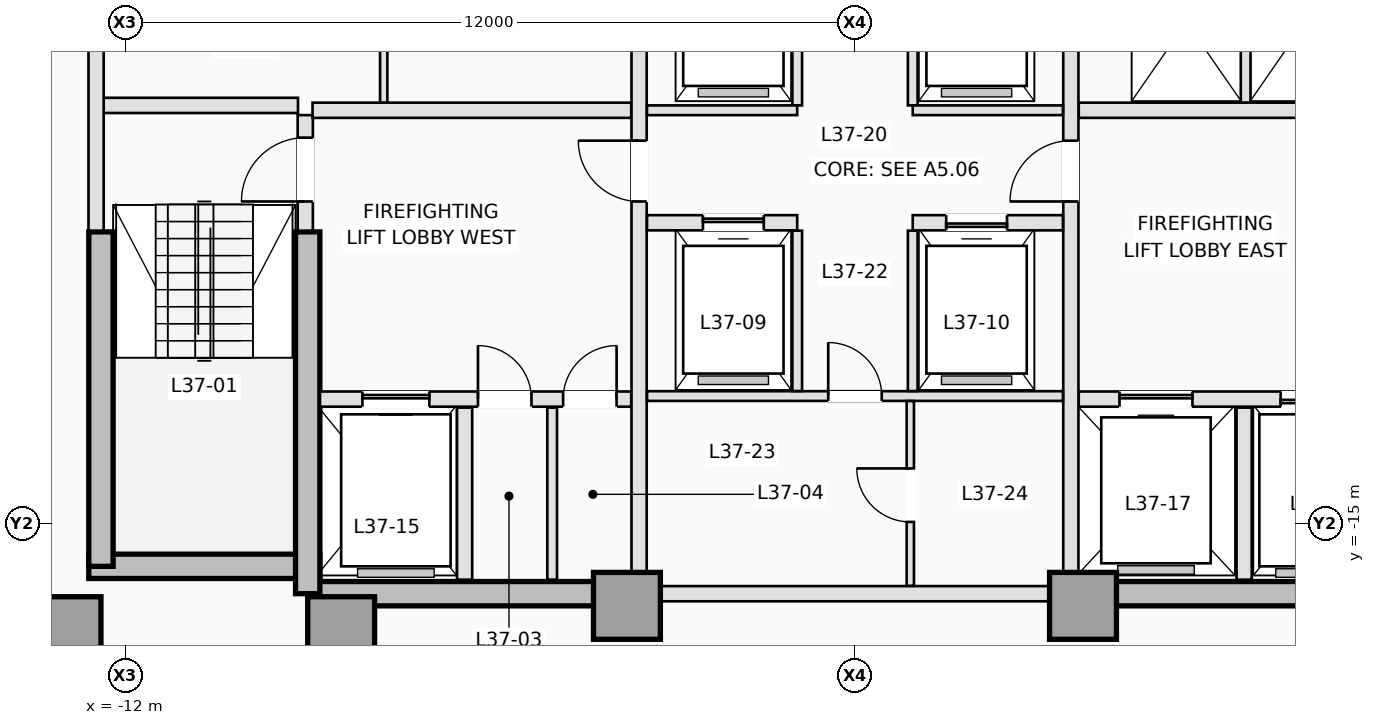
"""IFC4 building model, lengths in metres.
Left out: names, types, materials, properties, quantities, classifications, styles, units other than length and angle.
Written with IfcOpenShell. Run it as: python <this file> out.ifc"""

import sys

from ifc_helpers import new_model, si_unit, direction, frame, frame_2d, origin, origin_2d, place, context, subcontext, project, spatial, rectangle, extrude, element, fill, save


model = new_model("IFC4")
c1 = context("Model", 3, precision=1e-05, world=origin(), true_north=direction((0.0, 1.0)))
c2 = subcontext(c1, "Body", "Model", "MODEL_VIEW")
j1 = project(units=[si_unit("LENGTHUNIT", "METRE"), si_unit("PLANEANGLEUNIT", "RADIAN")], contexts=[c1])
p1 = place(None, origin())
s1 = spatial("IfcSite", under=j1, at=p1, CompositionType="ELEMENT")
p2 = place(p1, origin())
s2 = spatial("IfcBuilding", under=s1, at=p2, CompositionType="ELEMENT")
p3 = place(p2, frame((0.0, 0.0, 137.0)))
s3 = spatial("IfcBuildingStorey", under=s2, at=p3, CompositionType="ELEMENT", Elevation=137.0)
p4 = place(p3, frame((-12.6, -15.7, 0.0), z_axis=(0.0, 0.0, 1.0), x_axis=(1.0, 0.0, 0.0)))
e1 = element("IfcWall", 1, at=p4, inside=s3, PredefinedType="SHEAR", context=c2, shape_type="SweptSolid", body=[
    extrude(rectangle(XDim=3.8, YDim=0.4, at=frame_2d((1.9, 0.0))), origin(), (0.0, 0.0, 1.0), 3.5),
])
for number, where, z_axis, x_axis in (
    (2, (-9.0, -16.15, 0.0), (0.0, 0.0, 1.0), (1.0, 0.0, 0.0)),
    (3, (3.75, -16.15, 0.0), (0.0, 0.0, 1.0), (1.0, 0.0, 0.0)),
):
    element("IfcWall", number, at=place(p3, frame(where, z_axis=z_axis, x_axis=x_axis)), inside=s3, PredefinedType="SHEAR", context=c2, shape_type="SweptSolid", body=[
        extrude(rectangle(XDim=5.25, YDim=0.4, at=frame_2d((2.625, 0.0))), origin(), (0.0, 0.0, 1.0), 3.5),
    ])
p5 = place(p3, frame((-12.4, -15.7, 0.0), z_axis=(0.0, 0.0, 1.0), x_axis=(0.0, 1.0, 0.0)))
e4 = element("IfcWall", 4, at=p5, inside=s3, PredefinedType="SHEAR", context=c2, shape_type="SweptSolid", body=[
    extrude(rectangle(XDim=5.5, YDim=0.4, at=frame_2d((2.75, 0.0))), origin(), (0.0, 0.0, 1.0), 3.5),
])
p6 = place(p3, frame((-9.0, -16.15, 0.0), z_axis=(0.0, 0.0, 1.0), x_axis=(0.0, 1.0, 0.0)))
e5 = element("IfcWall", 5, at=p6, inside=s3, PredefinedType="SHEAR", context=c2, shape_type="SweptSolid", body=[
    extrude(rectangle(XDim=5.95, YDim=0.4, at=frame_2d((2.975, 0.0))), origin(), (0.0, 0.0, 1.0), 3.5),
])
for number, where, z_axis, x_axis in (
    (6, (-12.95, -16.75, 0.0), (0.0, 0.0, 1.0), (1.0, 0.0, 0.0)),
    (7, (-8.45, -16.75, 0.0), (0.0, 0.0, 1.0), (1.0, 0.0, 0.0)),
    (8, (-3.75, -16.35, 0.0), (0.0, 0.0, 1.0), (1.0, 0.0, 0.0)),
    (9, (3.75, -16.35, 0.0), (0.0, 0.0, 1.0), (1.0, 0.0, 0.0)),
):
    element("IfcColumn", number, at=place(p3, frame(where, z_axis=z_axis, x_axis=x_axis)), inside=s3, PredefinedType="COLUMN", context=c2, shape_type="SweptSolid", body=[
        extrude(rectangle(XDim=1.1, YDim=1.1, at=origin_2d()), origin(), (0.0, 0.0, 1.0), 3.5),
    ])
p7 = place(p3, frame((-9.04, -10.18, 0.0), z_axis=(0.0, 0.0, 1.0), x_axis=(0.0, 1.0, 0.0)))
e10 = element("IfcWall", 10, at=p7, inside=s3, PredefinedType="PARTITIONING", context=c2, shape_type="SweptSolid", body=[
    extrude(rectangle(XDim=1.9, YDim=0.25, at=frame_2d((0.95, 0.0))), origin(), (0.0, 0.0, 1.0), 3.25),
])
p8 = place(p7, frame((0.48, 0.0, 0.0)))
e11 = element("IfcOpeningElement", 11, at=p8, cuts=e10, PredefinedType="OPENING", context=c2, shape_type="SweptSolid", body=[
    extrude(rectangle(XDim=1.05, YDim=2.15, at=frame_2d((0.525, 1.075))), frame((0.0, 0.135, 0.0), z_axis=(0.0, -1.0, 0.0), x_axis=(1.0, 0.0, 0.0)), (0.0, 0.0, 1.0), 0.27),
])
p9 = place(p3, frame((-12.38, -8.12, 0.0), z_axis=(0.0, 0.0, 1.0), x_axis=(1.0, 0.0, 0.0)))
e12 = element("IfcWall", 12, at=p9, inside=s3, PredefinedType="PARTITIONING", context=c2, shape_type="SweptSolid", body=[
    extrude(rectangle(XDim=3.22, YDim=0.25, at=frame_2d((1.61, 0.0))), origin(), (0.0, 0.0, 1.0), 3.25),
])
p10 = place(p3, frame((-12.48, -10.18, 0.0), z_axis=(0.0, 0.0, 1.0), x_axis=(0.0, 1.0, 0.0)))
e13 = element("IfcWall", 13, at=p10, inside=s3, PredefinedType="PARTITIONING", context=c2, shape_type="SweptSolid", body=[
    extrude(rectangle(XDim=4.828, YDim=0.25, at=frame_2d((2.414, 0.0))), origin(), (0.0, 0.0, 1.0), 3.25),
])
p11 = place(p3, frame((-8.798, -12.95, 0.0), z_axis=(0.0, 0.0, 1.0), x_axis=(1.0, 0.0, 0.0)))
e14 = element("IfcWall", 14, at=p11, inside=s3, PredefinedType="PARTITIONING", context=c2, shape_type="SweptSolid", body=[
    extrude(rectangle(XDim=5.118, YDim=0.25, at=frame_2d((2.559, 0.0))), origin(), (0.0, 0.0, 1.0), 3.25),
])
p12 = place(p11, frame((0.698, 0.0, 0.0)))
e15 = element("IfcOpeningElement", 15, at=p12, cuts=e14, PredefinedType="OPENING", context=c2, shape_type="SweptSolid", body=[
    extrude(rectangle(XDim=1.1, YDim=2.15, at=frame_2d((0.55, 1.075))), frame((0.0, 0.135, 0.0), z_axis=(0.0, -1.0, 0.0), x_axis=(1.0, 0.0, 0.0)), (0.0, 0.0, 1.0), 0.27),
])
p13 = place(p11, frame((2.598, 0.0, 0.0)))
e16 = element("IfcOpeningElement", 16, at=p13, cuts=e14, PredefinedType="OPENING", context=c2, shape_type="SweptSolid", body=[
    extrude(rectangle(XDim=0.88, YDim=2.1, at=frame_2d((0.44, 1.05))), frame((0.0, 0.135, 0.0), z_axis=(0.0, -1.0, 0.0), x_axis=(1.0, 0.0, 0.0)), (0.0, 0.0, 1.0), 0.27),
])
p14 = place(p11, frame((3.998, 0.0, 0.0)))
e17 = element("IfcOpeningElement", 17, at=p14, cuts=e14, PredefinedType="OPENING", context=c2, shape_type="SweptSolid", body=[
    extrude(rectangle(XDim=0.88, YDim=2.1, at=frame_2d((0.44, 1.05))), frame((0.0, 0.135, 0.0), z_axis=(0.0, -1.0, 0.0), x_axis=(1.0, 0.0, 0.0)), (0.0, 0.0, 1.0), 0.27),
])
p15 = place(p3, frame((3.68, -12.95, 0.0), z_axis=(0.0, 0.0, 1.0), x_axis=(1.0, 0.0, 0.0)))
e18 = element("IfcWall", 18, at=p15, inside=s3, PredefinedType="PARTITIONING", context=c2, shape_type="SweptSolid", body=[
    extrude(rectangle(XDim=5.118, YDim=0.25, at=frame_2d((2.559, 0.0))), origin(), (0.0, 0.0, 1.0), 3.25),
])
p16 = place(p15, frame((3.32, 0.0, 0.0)))
e19 = element("IfcOpeningElement", 19, at=p16, cuts=e18, PredefinedType="OPENING", context=c2, shape_type="SweptSolid", body=[
    extrude(rectangle(XDim=1.1, YDim=2.15, at=frame_2d((0.55, 1.075))), frame((0.0, 0.135, 0.0), z_axis=(0.0, -1.0, 0.0), x_axis=(1.0, 0.0, 0.0)), (0.0, 0.0, 1.0), 0.27),
])
p17 = place(p15, frame((0.67, 0.0, 0.0)))
e20 = element("IfcOpeningElement", 20, at=p17, cuts=e18, PredefinedType="OPENING", context=c2, shape_type="SweptSolid", body=[
    extrude(rectangle(XDim=1.2, YDim=2.15, at=frame_2d((0.6, 1.075))), frame((0.0, 0.135, 0.0), z_axis=(0.0, -1.0, 0.0), x_axis=(1.0, 0.0, 0.0)), (0.0, 0.0, 1.0), 0.27),
])
p18 = place(p3, frame((-6.42, -15.92, 0.0), z_axis=(0.0, 0.0, 1.0), x_axis=(0.0, 1.0, 0.0)))
e21 = element("IfcWall", 21, at=p18, inside=s3, PredefinedType="PARTITIONING", context=c2, shape_type="SweptSolid", body=[
    extrude(rectangle(XDim=2.83, YDim=0.25, at=frame_2d((1.415, 0.0))), origin(), (0.0, 0.0, 1.0), 3.25),
])
p19 = place(p3, frame((-4.98, -15.92, 0.0), z_axis=(0.0, 0.0, 1.0), x_axis=(0.0, 1.0, 0.0)))
e22 = element("IfcWall", 22, at=p19, inside=s3, PredefinedType="PARTITIONING", context=c2, shape_type="SweptSolid", body=[
    extrude(rectangle(XDim=2.83, YDim=0.16, at=frame_2d((1.415, 0.0))), origin(), (0.0, 0.0, 1.0), 3.25),
])
p20 = place(p3, frame((6.4, -15.92, 0.0), z_axis=(0.0, 0.0, 1.0), x_axis=(0.0, 1.0, 0.0)))
e23 = element("IfcWall", 23, at=p20, inside=s3, PredefinedType="PARTITIONING", context=c2, shape_type="SweptSolid", body=[
    extrude(rectangle(XDim=2.83, YDim=0.25, at=frame_2d((1.415, 0.0))), origin(), (0.0, 0.0, 1.0), 3.25),
])
for number, where, z_axis, x_axis in (
    (24, (-8.92, -8.2, 0.0), (0.0, 0.0, 1.0), (1.0, 0.0, 0.0)),
    (25, (3.68, -8.2, 0.0), (0.0, 0.0, 1.0), (1.0, 0.0, 0.0)),
):
    element("IfcWall", number, at=place(p3, frame(where, z_axis=z_axis, x_axis=x_axis)), inside=s3, PredefinedType="PARTITIONING", context=c2, shape_type="SweptSolid", body=[
        extrude(rectangle(XDim=5.24, YDim=0.25, at=frame_2d((2.62, 0.0))), origin(), (0.0, 0.0, 1.0), 3.25),
    ])
p21 = place(p3, frame((-3.55, -15.798, 0.0), z_axis=(0.0, 0.0, 1.0), x_axis=(0.0, 1.0, 0.0)))
e26 = element("IfcWall", 26, at=p21, inside=s3, PredefinedType="PARTITIONING", context=c2, shape_type="SweptSolid", body=[
    extrude(rectangle(XDim=10.446, YDim=0.25, at=frame_2d((5.223, 0.0))), origin(), (0.0, 0.0, 1.0), 3.25),
])
p22 = place(p21, frame((6.098, 0.0, 0.0)))
e27 = element("IfcOpeningElement", 27, at=p22, cuts=e26, PredefinedType="OPENING", context=c2, shape_type="SweptSolid", body=[
    extrude(rectangle(XDim=1.0, YDim=2.15, at=frame_2d((0.5, 1.075))), frame((0.0, 0.135, 0.0), z_axis=(0.0, -1.0, 0.0), x_axis=(1.0, 0.0, 0.0)), (0.0, 0.0, 1.0), 0.27),
])
p23 = place(p3, frame((3.55, -15.798, 0.0), z_axis=(0.0, 0.0, 1.0), x_axis=(0.0, 1.0, 0.0)))
e28 = element("IfcWall", 28, at=p23, inside=s3, PredefinedType="PARTITIONING", context=c2, shape_type="SweptSolid", body=[
    extrude(rectangle(XDim=10.446, YDim=0.25, at=frame_2d((5.223, 0.0))), origin(), (0.0, 0.0, 1.0), 3.25),
])
p24 = place(p23, frame((6.098, 0.0, 0.0)))
e29 = element("IfcOpeningElement", 29, at=p24, cuts=e28, PredefinedType="OPENING", context=c2, shape_type="SweptSolid", body=[
    extrude(rectangle(XDim=1.0, YDim=2.15, at=frame_2d((0.5, 1.075))), frame((0.0, 0.135, 0.0), z_axis=(0.0, -1.0, 0.0), x_axis=(1.0, 0.0, 0.0)), (0.0, 0.0, 1.0), 0.27),
])
p25 = place(p3, frame((-7.75, -8.073, 0.0), z_axis=(0.0, 0.0, 1.0), x_axis=(0.0, 1.0, 0.0)))
e30 = element("IfcWall", 30, at=p25, inside=s3, PredefinedType="PARTITIONING", context=c2, shape_type="SweptSolid", body=[
    extrude(rectangle(XDim=2.733, YDim=0.12, at=frame_2d((1.366, 0.0))), origin(), (0.0, 0.0, 1.0), 3.25),
])
p26 = place(p3, frame((6.425, -8.073, 0.0), z_axis=(0.0, 0.0, 1.0), x_axis=(0.0, 1.0, 0.0)))
e31 = element("IfcWall", 31, at=p26, inside=s3, PredefinedType="PARTITIONING", context=c2, shape_type="SweptSolid", body=[
    extrude(rectangle(XDim=2.733, YDim=0.16, at=frame_2d((1.366, 0.0))), origin(), (0.0, 0.0, 1.0), 3.25),
])
p27 = place(p3, frame((-3.198, -16.15, 0.0), z_axis=(0.0, 0.0, 1.0), x_axis=(1.0, 0.0, 0.0)))
e32 = element("IfcWall", 32, at=p27, inside=s3, PredefinedType="PARTITIONING", context=c2, shape_type="SweptSolid", body=[
    extrude(rectangle(XDim=6.396, YDim=0.25, at=frame_2d((3.198, 0.0))), origin(), (0.0, 0.0, 1.0), 2.45),
])
for number, where, z_axis, x_axis in (
    (33, (-0.95, -8.12, 0.0), (0.0, 0.0, 1.0), (0.0, 1.0, 0.0)),
    (34, (0.95, -8.12, 0.0), (0.0, 0.0, 1.0), (0.0, 1.0, 0.0)),
):
    element("IfcWall", number, at=place(p3, frame(where, z_axis=z_axis, x_axis=x_axis)), inside=s3, PredefinedType="PARTITIONING", context=c2, shape_type="SweptSolid", body=[
        extrude(rectangle(XDim=2.78, YDim=0.16, at=frame_2d((1.39, 0.0))), origin(), (0.0, 0.0, 1.0), 3.25),
    ])
for number, where, z_axis, x_axis in (
    (35, (-3.42, -8.2, 0.0), (0.0, 0.0, 1.0), (1.0, 0.0, 0.0)),
    (36, (0.95, -8.2, 0.0), (0.0, 0.0, 1.0), (1.0, 0.0, 0.0)),
):
    element("IfcWall", number, at=place(p3, frame(where, z_axis=z_axis, x_axis=x_axis)), inside=s3, PredefinedType="PARTITIONING", context=c2, shape_type="SweptSolid", body=[
        extrude(rectangle(XDim=2.47, YDim=0.16, at=frame_2d((1.235, 0.0))), origin(), (0.0, 0.0, 1.0), 3.25),
    ])
p28 = place(p3, frame((-3.42, -10.05, 0.0), z_axis=(0.0, 0.0, 1.0), x_axis=(1.0, 0.0, 0.0)))
e37 = element("IfcWall", 37, at=p28, inside=s3, PredefinedType="PARTITIONING", context=c2, shape_type="SweptSolid", body=[
    extrude(rectangle(XDim=2.47, YDim=0.25, at=frame_2d((1.235, 0.0))), origin(), (0.0, 0.0, 1.0), 3.25),
])
p29 = place(p28, frame((0.92, 0.0, 0.0)))
e38 = element("IfcOpeningElement", 38, at=p29, cuts=e37, PredefinedType="OPENING", context=c2, shape_type="SweptSolid", body=[
    extrude(rectangle(XDim=1.0, YDim=2.15, at=frame_2d((0.5, 1.075))), frame((0.0, 0.135, 0.0), z_axis=(0.0, -1.0, 0.0), x_axis=(1.0, 0.0, 0.0)), (0.0, 0.0, 1.0), 0.27),
])
p30 = place(p3, frame((0.95, -10.05, 0.0), z_axis=(0.0, 0.0, 1.0), x_axis=(1.0, 0.0, 0.0)))
e39 = element("IfcWall", 39, at=p30, inside=s3, PredefinedType="PARTITIONING", context=c2, shape_type="SweptSolid", body=[
    extrude(rectangle(XDim=2.47, YDim=0.25, at=frame_2d((1.235, 0.0))), origin(), (0.0, 0.0, 1.0), 3.25),
])
p31 = place(p30, frame((0.55, 0.0, 0.0)))
e40 = element("IfcOpeningElement", 40, at=p31, cuts=e39, PredefinedType="OPENING", context=c2, shape_type="SweptSolid", body=[
    extrude(rectangle(XDim=1.0, YDim=2.15, at=frame_2d((0.5, 1.075))), frame((0.0, 0.135, 0.0), z_axis=(0.0, -1.0, 0.0), x_axis=(1.0, 0.0, 0.0)), (0.0, 0.0, 1.0), 0.27),
])
p32 = place(p3, frame((-3.42, -12.9, 0.0), z_axis=(0.0, 0.0, 1.0), x_axis=(1.0, 0.0, 0.0)))
e41 = element("IfcWall", 41, at=p32, inside=s3, PredefinedType="PARTITIONING", context=c2, shape_type="SweptSolid", body=[
    extrude(rectangle(XDim=6.84, YDim=0.16, at=frame_2d((3.42, 0.0))), origin(), (0.0, 0.0, 1.0), 3.25),
])
p33 = place(p32, frame((2.98, 0.0, 0.0)))
e42 = element("IfcOpeningElement", 42, at=p33, cuts=e41, PredefinedType="OPENING", context=c2, shape_type="SweptSolid", body=[
    extrude(rectangle(XDim=0.88, YDim=2.12, at=frame_2d((0.44, 1.06))), frame((0.0, 0.09, 0.0), z_axis=(0.0, -1.0, 0.0), x_axis=(1.0, 0.0, 0.0)), (0.0, 0.0, 1.0), 0.18),
])
for number, where, z_axis, x_axis in (
    (43, (-0.95, -12.818, 0.0), (0.0, 0.0, 1.0), (0.0, 1.0, 0.0)),
    (44, (0.95, -12.818, 0.0), (0.0, 0.0, 1.0), (0.0, 1.0, 0.0)),
):
    element("IfcWall", number, at=place(p3, frame(where, z_axis=z_axis, x_axis=x_axis)), inside=s3, PredefinedType="PARTITIONING", context=c2, shape_type="SweptSolid", body=[
        extrude(rectangle(XDim=2.638, YDim=0.16, at=frame_2d((1.319, 0.0))), origin(), (0.0, 0.0, 1.0), 3.25),
    ])
p34 = place(p3, frame((0.91, -16.02, 0.0), z_axis=(0.0, 0.0, 1.0), x_axis=(0.0, 1.0, 0.0)))
e45 = element("IfcWall", 45, at=p34, inside=s3, PredefinedType="PARTITIONING", context=c2, shape_type="SweptSolid", body=[
    extrude(rectangle(XDim=3.038, YDim=0.12, at=frame_2d((1.519, 0.0))), origin(), (0.0, 0.0, 1.0), 3.25),
])
p35 = place(p34, frame((1.05, 0.0, 0.0)))
e46 = element("IfcOpeningElement", 46, at=p35, cuts=e45, PredefinedType="OPENING", context=c2, shape_type="SweptSolid", body=[
    extrude(rectangle(XDim=0.88, YDim=2.12, at=frame_2d((0.44, 1.06))), frame((0.0, 0.07, 0.0), z_axis=(0.0, -1.0, 0.0), x_axis=(1.0, 0.0, 0.0)), (0.0, 0.0, 1.0), 0.14),
])
p36 = place(p12, origin())
e47 = element("IfcDoor", 47, at=p36, inside=s3, OperationType="SLIDING_TO_LEFT", PredefinedType="DOOR", context=c2, shape_type="SweptSolid", body=[
    extrude(rectangle(XDim=1.1, YDim=2.15, at=frame_2d((0.55, 1.075))), frame((0.0, 0.025, 0.0), z_axis=(0.0, -1.0, 0.0), x_axis=(1.0, 0.0, 0.0)), (0.0, 0.0, 1.0), 0.05),
])
fill(e15, e47)
p37 = place(p16, origin())
e48 = element("IfcDoor", 48, at=p37, inside=s3, OperationType="SLIDING_TO_RIGHT", PredefinedType="DOOR", context=c2, shape_type="SweptSolid", body=[
    extrude(rectangle(XDim=1.1, YDim=2.15, at=frame_2d((0.55, 1.075))), frame((0.0, 0.025, 0.0), z_axis=(0.0, -1.0, 0.0), x_axis=(1.0, 0.0, 0.0)), (0.0, 0.0, 1.0), 0.05),
])
fill(e19, e48)
p38 = place(p17, origin())
e49 = element("IfcDoor", 49, at=p38, inside=s3, OperationType="SLIDING_TO_LEFT", PredefinedType="DOOR", context=c2, shape_type="SweptSolid", body=[
    extrude(rectangle(XDim=1.2, YDim=2.15, at=frame_2d((0.6, 1.075))), frame((0.0, 0.025, 0.0), z_axis=(0.0, -1.0, 0.0), x_axis=(1.0, 0.0, 0.0)), (0.0, 0.0, 1.0), 0.05),
])
fill(e20, e49)
p39 = place(p29, origin())
e50 = element("IfcDoor", 50, at=p39, inside=s3, OperationType="SLIDING_TO_LEFT", PredefinedType="DOOR", context=c2, shape_type="SweptSolid", body=[
    extrude(rectangle(XDim=1.0, YDim=2.15, at=frame_2d((0.5, 1.075))), frame((0.0, 0.025, 0.0), z_axis=(0.0, -1.0, 0.0), x_axis=(1.0, 0.0, 0.0)), (0.0, 0.0, 1.0), 0.05),
])
fill(e38, e50)
p40 = place(p31, origin())
e51 = element("IfcDoor", 51, at=p40, inside=s3, OperationType="SLIDING_TO_RIGHT", PredefinedType="DOOR", context=c2, shape_type="SweptSolid", body=[
    extrude(rectangle(XDim=1.0, YDim=2.15, at=frame_2d((0.5, 1.075))), frame((0.0, 0.025, 0.0), z_axis=(0.0, -1.0, 0.0), x_axis=(1.0, 0.0, 0.0)), (0.0, 0.0, 1.0), 0.05),
])
fill(e40, e51)
p41 = place(p8, origin())
e52 = element("IfcDoor", 52, at=p41, inside=s3, OperationType="SINGLE_SWING_LEFT", PredefinedType="DOOR", context=c2, shape_type="SweptSolid", body=[
    extrude(rectangle(XDim=1.05, YDim=2.15, at=frame_2d((0.525, 1.075))), frame((0.0, 0.025, 0.0), z_axis=(0.0, -1.0, 0.0), x_axis=(1.0, 0.0, 0.0)), (0.0, 0.0, 1.0), 0.05),
])
fill(e11, e52)
p42 = place(p13, origin())
e53 = element("IfcDoor", 53, at=p42, inside=s3, OperationType="SINGLE_SWING_LEFT", PredefinedType="TRAPDOOR", context=c2, shape_type="SweptSolid", body=[
    extrude(rectangle(XDim=0.88, YDim=2.1, at=frame_2d((0.44, 1.05))), frame((0.0, 0.025, 0.0), z_axis=(0.0, -1.0, 0.0), x_axis=(1.0, 0.0, 0.0)), (0.0, 0.0, 1.0), 0.05),
])
fill(e16, e53)
p43 = place(p14, origin())
e54 = element("IfcDoor", 54, at=p43, inside=s3, OperationType="SINGLE_SWING_RIGHT", PredefinedType="TRAPDOOR", context=c2, shape_type="SweptSolid", body=[
    extrude(rectangle(XDim=0.88, YDim=2.1, at=frame_2d((0.44, 1.05))), frame((0.0, 0.025, 0.0), z_axis=(0.0, -1.0, 0.0), x_axis=(1.0, 0.0, 0.0)), (0.0, 0.0, 1.0), 0.05),
])
fill(e17, e54)
p44 = place(p22, origin())
e55 = element("IfcDoor", 55, at=p44, inside=s3, OperationType="SINGLE_SWING_RIGHT", PredefinedType="DOOR", context=c2, shape_type="SweptSolid", body=[
    extrude(rectangle(XDim=1.0, YDim=2.15, at=frame_2d((0.5, 1.075))), frame((0.0, 0.025, 0.0), z_axis=(0.0, -1.0, 0.0), x_axis=(1.0, 0.0, 0.0)), (0.0, 0.0, 1.0), 0.05),
])
fill(e27, e55)
p45 = place(p24, origin())
e56 = element("IfcDoor", 56, at=p45, inside=s3, OperationType="SINGLE_SWING_LEFT", PredefinedType="DOOR", context=c2, shape_type="SweptSolid", body=[
    extrude(rectangle(XDim=1.0, YDim=2.15, at=frame_2d((0.5, 1.075))), frame((0.0, 0.025, 0.0), z_axis=(0.0, -1.0, 0.0), x_axis=(1.0, 0.0, 0.0)), (0.0, 0.0, 1.0), 0.05),
])
fill(e29, e56)
p46 = place(p33, origin())
e57 = element("IfcDoor", 57, at=p46, inside=s3, OperationType="SINGLE_SWING_LEFT", PredefinedType="DOOR", context=c2, shape_type="SweptSolid", body=[
    extrude(rectangle(XDim=0.88, YDim=2.12, at=frame_2d((0.44, 1.06))), frame((0.0, 0.025, 0.0), z_axis=(0.0, -1.0, 0.0), x_axis=(1.0, 0.0, 0.0)), (0.0, 0.0, 1.0), 0.05),
])
fill(e42, e57)
p47 = place(p35, origin())
e58 = element("IfcDoor", 58, at=p47, inside=s3, OperationType="SINGLE_SWING_RIGHT", PredefinedType="DOOR", context=c2, shape_type="SweptSolid", body=[
    extrude(rectangle(XDim=0.88, YDim=2.12, at=frame_2d((0.44, 1.06))), frame((0.0, 0.025, 0.0), z_axis=(0.0, -1.0, 0.0), x_axis=(1.0, 0.0, 0.0)), (0.0, 0.0, 1.0), 0.05),
])
fill(e46, e58)
save(model, sys.argv[1])
